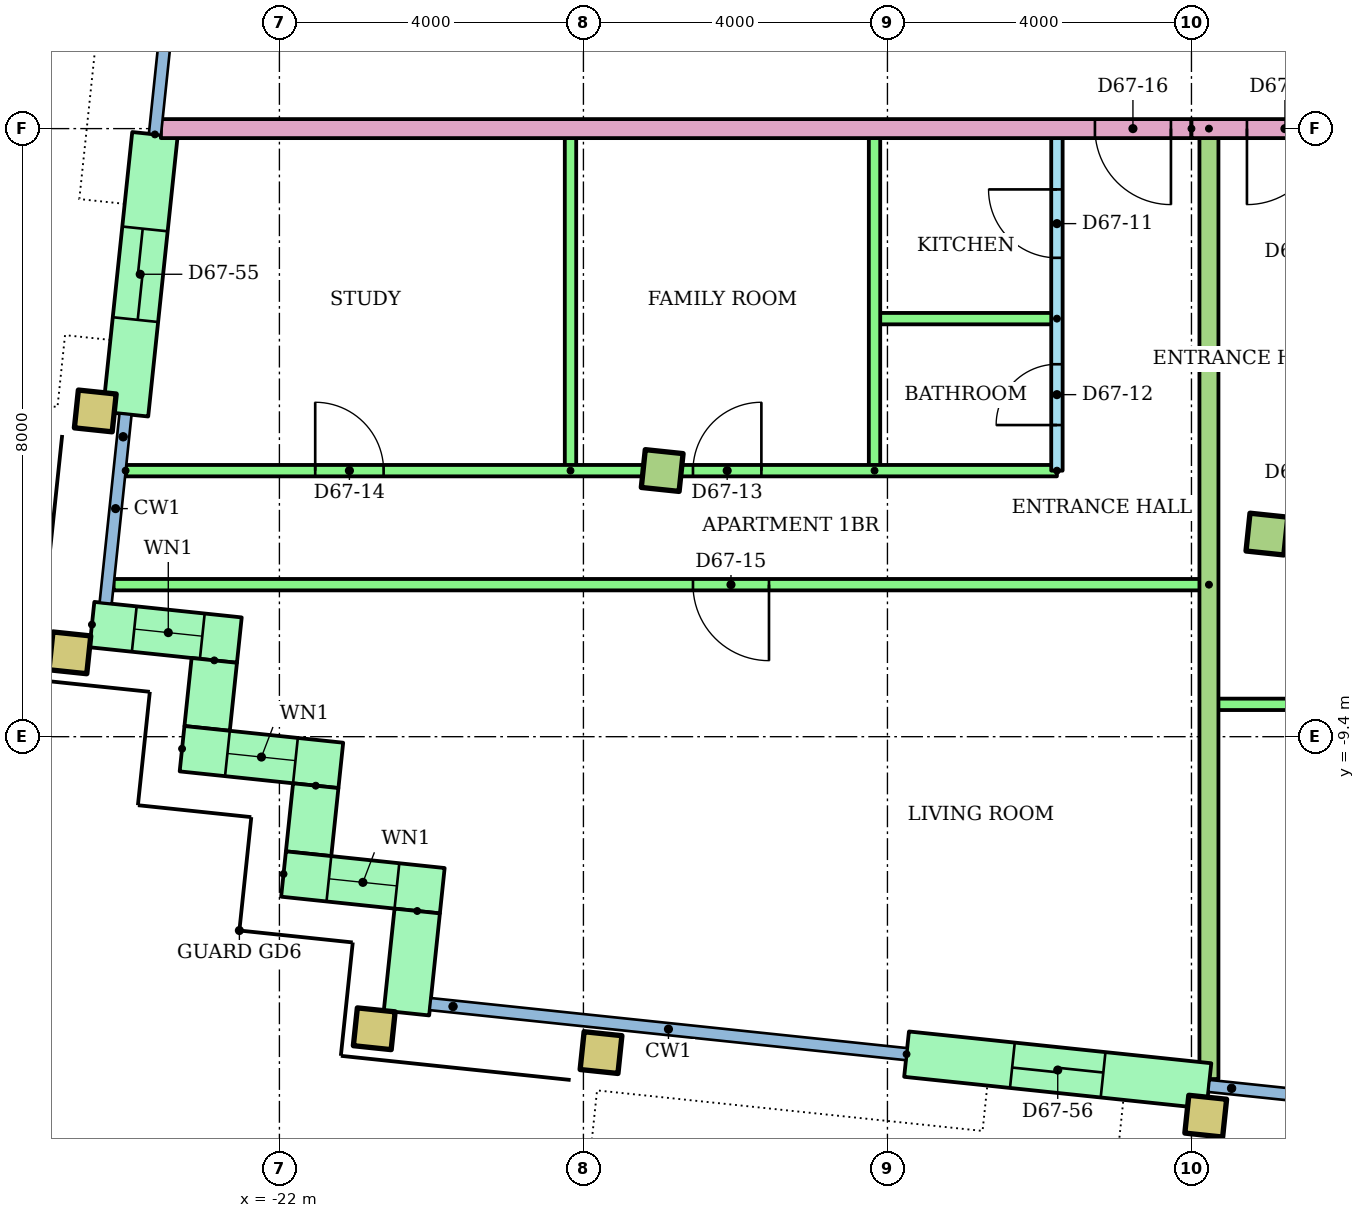
"""IFC4 building model, lengths in metres.
Left out: names, types, materials, properties, quantities, classifications, styles, units other than length and angle.
Written with IfcOpenShell. Run it as: python <this file> out.ifc"""

import sys

from ifc_helpers import new_model, si_unit, direction, frame, frame_2d, origin, origin_2d, place, context, subcontext, project, spatial, rectangle, hollow_rectangle, extrude, element, fill, save


model = new_model("IFC4")
c1 = context("Model", 3, precision=1e-05, world=origin(), true_north=direction((0.0, 1.0)))
c2 = subcontext(c1, "Body", "Model", "MODEL_VIEW")
j1 = project(units=[si_unit("LENGTHUNIT", "METRE"), si_unit("PLANEANGLEUNIT", "RADIAN")], contexts=[c1])
p1 = place(None, origin())
s1 = spatial("IfcSite", under=j1, at=p1, CompositionType="ELEMENT")
p2 = place(p1, origin())
s2 = spatial("IfcBuilding", under=s1, at=p2, CompositionType="ELEMENT")
p3 = place(p2, frame((0.0, 0.0, 259.5)))
s3 = spatial("IfcBuildingStorey", under=s2, at=p3, CompositionType="ELEMENT", Elevation=259.5)
for number, where, z_axis, x_axis in (
    (1, (-20.752, -13.243, 0.0), (0.0, 0.0, 1.0), (0.995, -0.105, 0.0)),
    (2, (-17.768, -13.556, 0.0), (0.0, 0.0, 1.0), (0.995, -0.105, 0.0)),
    (3, (-9.812, -14.392, 0.0), (0.0, 0.0, 1.0), (0.995, -0.105, 0.0)),
    (4, (-24.757, -8.297, 0.0), (0.0, 0.0, 1.0), (0.995, -0.105, 0.0)),
    (5, (-24.423, -5.115, 0.0), (0.0, 0.0, 1.0), (0.995, -0.105, 0.0)),
):
    element("IfcColumn", number, at=place(p3, frame(where, z_axis=z_axis, x_axis=x_axis)), inside=s3, PredefinedType="COLUMN", context=c2, shape_type="SweptSolid", body=[
        extrude(hollow_rectangle(XDim=0.5, YDim=0.5, WallThickness=0.025, at=origin_2d()), origin(), (0.0, 0.0, 1.0), 3.2),
    ])
for number, where, z_axis, x_axis in (
    (6, (-16.964, -5.898, 0.0), (0.0, 0.0, 1.0), (0.995, -0.105, 0.0)),
    (7, (-9.007, -6.735, 0.0), (0.0, 0.0, 1.0), (0.995, -0.105, 0.0)),
):
    element("IfcColumn", number, at=place(p3, frame(where, z_axis=z_axis, x_axis=x_axis)), inside=s3, PredefinedType="COLUMN", context=c2, shape_type="SweptSolid", body=[
        extrude(rectangle(XDim=0.5, YDim=0.5, at=origin_2d()), origin(), (0.0, 0.0, 1.0), 3.2),
    ])
p4 = place(p3, frame((-23.638, -1.476, 0.0), z_axis=(0.0, 0.0, 1.0), x_axis=(-0.104513052986, -0.994523514933, 0.0)))
e8 = element("IfcWall", 8, at=p4, inside=s3, PredefinedType="STANDARD", context=c2, shape_type="SweptSolid", body=[
    extrude(rectangle(XDim=3.7, YDim=0.6, at=frame_2d((1.85, 0.0))), origin(), (0.0, 0.0, 1.0), 2.92),
])
p5 = place(p4, frame((1.25, 0.0, 0.0)))
e9 = element("IfcOpeningElement", 9, at=p5, cuts=e8, PredefinedType="OPENING", context=c2, shape_type="SweptSolid", body=[
    extrude(rectangle(XDim=1.2, YDim=2.1, at=frame_2d((0.6, 1.05))), frame((0.0, 0.31, 0.0), z_axis=(0.0, -1.0, 0.0), x_axis=(1.0, 0.0, 0.0)), (0.0, 0.0, 1.0), 0.62),
])
p6 = place(p3, frame((-24.467, -7.925, 0.0), z_axis=(0.0, 0.0, 1.0), x_axis=(0.994521219184, -0.104534896528, 0.0)))
e10 = element("IfcWall", 10, at=p6, inside=s3, PredefinedType="STANDARD", context=c2, shape_type="SweptSolid", body=[
    extrude(rectangle(XDim=1.95, YDim=0.6, at=frame_2d((0.975, 0.0))), origin(), (0.0, 0.0, 1.0), 2.92),
])
p7 = place(p6, frame((0.56, 0.0, 0.9)))
e11 = element("IfcOpeningElement", 11, at=p7, cuts=e10, PredefinedType="OPENING", context=c2, shape_type="SweptSolid", body=[
    extrude(rectangle(XDim=0.9, YDim=1.5, at=frame_2d((0.45, 0.75))), frame((0.0, 0.31, 0.0), z_axis=(0.0, -1.0, 0.0), x_axis=(1.0, 0.0, 0.0)), (0.0, 0.0, 1.0), 0.62),
])
p8 = place(p3, frame((-22.857, -8.396, 0.0), z_axis=(0.0, 0.0, 1.0), x_axis=(-0.104444712852, -0.994530694326, 0.0)))
e12 = element("IfcWall", 12, at=p8, inside=s3, PredefinedType="STANDARD", context=c2, shape_type="SweptSolid", body=[
    extrude(rectangle(XDim=0.9, YDim=0.6, at=frame_2d((0.45, 0.0))), origin(), (0.0, 0.0, 1.0), 2.92),
])
p9 = place(p3, frame((-23.281, -9.558, 0.0), z_axis=(0.0, 0.0, 1.0), x_axis=(0.994523910136, -0.104509292252, 0.0)))
e13 = element("IfcWall", 13, at=p9, inside=s3, PredefinedType="STANDARD", context=c2, shape_type="SweptSolid", body=[
    extrude(rectangle(XDim=2.1, YDim=0.6, at=frame_2d((1.05, 0.0))), origin(), (0.0, 0.0, 1.0), 2.92),
])
p10 = place(p9, frame((0.6, 0.0, 0.9)))
e14 = element("IfcOpeningElement", 14, at=p10, cuts=e13, PredefinedType="OPENING", context=c2, shape_type="SweptSolid", body=[
    extrude(rectangle(XDim=0.9, YDim=1.5, at=frame_2d((0.45, 0.75))), frame((0.0, 0.31, 0.0), z_axis=(0.0, -1.0, 0.0), x_axis=(1.0, 0.0, 0.0)), (0.0, 0.0, 1.0), 0.62),
])
p11 = place(p3, frame((-21.522, -10.044, 0.0), z_axis=(0.0, 0.0, 1.0), x_axis=(-0.104416541099, -0.994533652495, 0.0)))
e15 = element("IfcWall", 15, at=p11, inside=s3, PredefinedType="STANDARD", context=c2, shape_type="SweptSolid", body=[
    extrude(rectangle(XDim=0.9, YDim=0.6, at=frame_2d((0.45, 0.0))), origin(), (0.0, 0.0, 1.0), 2.92),
])
p12 = place(p3, frame((-21.946, -11.207, 0.0), z_axis=(0.0, 0.0, 1.0), x_axis=(0.994511820899, -0.104624271047, 0.0)))
e16 = element("IfcWall", 16, at=p12, inside=s3, PredefinedType="STANDARD", context=c2, shape_type="SweptSolid", body=[
    extrude(rectangle(XDim=2.1, YDim=0.6, at=frame_2d((1.05, 0.0))), origin(), (0.0, 0.0, 1.0), 2.92),
])
p13 = place(p12, frame((0.6, 0.0, 0.9)))
e17 = element("IfcOpeningElement", 17, at=p13, cuts=e16, PredefinedType="OPENING", context=c2, shape_type="SweptSolid", body=[
    extrude(rectangle(XDim=0.9, YDim=1.5, at=frame_2d((0.45, 0.75))), frame((0.0, 0.31, 0.0), z_axis=(0.0, -1.0, 0.0), x_axis=(1.0, 0.0, 0.0)), (0.0, 0.0, 1.0), 0.62),
])
p14 = place(p3, frame((-20.187, -11.693, 0.0), z_axis=(0.0, 0.0, 1.0), x_axis=(-0.1043365026, -0.994542052517, 0.0)))
e18 = element("IfcWall", 18, at=p14, inside=s3, PredefinedType="STANDARD", context=c2, shape_type="SweptSolid", body=[
    extrude(rectangle(XDim=1.35, YDim=0.6, at=frame_2d((0.675, 0.0))), origin(), (0.0, 0.0, 1.0), 2.92),
])
p15 = place(p3, frame((-13.749, -13.576, 0.0), z_axis=(0.0, 0.0, 1.0), x_axis=(0.994519156568, -0.104554517933, 0.0)))
e19 = element("IfcWall", 19, at=p15, inside=s3, PredefinedType="STANDARD", context=c2, shape_type="SweptSolid", body=[
    extrude(rectangle(XDim=4.0, YDim=0.6, at=frame_2d((2.0, 0.0))), origin(), (0.0, 0.0, 1.0), 2.92),
])
p16 = place(p15, frame((1.4, 0.0, 0.0)))
e20 = element("IfcOpeningElement", 20, at=p16, cuts=e19, PredefinedType="OPENING", context=c2, shape_type="SweptSolid", body=[
    extrude(rectangle(XDim=1.2, YDim=2.1, at=frame_2d((0.6, 1.05))), frame((0.0, 0.31, 0.0), z_axis=(0.0, -1.0, 0.0), x_axis=(1.0, 0.0, 0.0)), (0.0, 0.0, 1.0), 0.62),
])
p17 = place(p3, frame((-11.77, -5.9, 0.0), z_axis=(0.0, 0.0, 1.0), x_axis=(0.0, 1.0, 0.0)))
e21 = element("IfcWall", 21, at=p17, inside=s3, PredefinedType="PARTITIONING", context=c2, shape_type="SweptSolid", body=[
    extrude(rectangle(XDim=4.5, YDim=0.15, at=frame_2d((2.25, 0.0))), origin(), (0.0, 0.0, 1.0), 2.4),
])
p18 = place(p17, frame((2.8, 0.0, 0.0)))
e22 = element("IfcOpeningElement", 22, at=p18, cuts=e21, PredefinedType="OPENING", context=c2, shape_type="SweptSolid", body=[
    extrude(rectangle(XDim=0.9, YDim=2.1, at=frame_2d((0.45, 1.05))), frame((0.0, 0.085, 0.0), z_axis=(0.0, -1.0, 0.0), x_axis=(1.0, 0.0, 0.0)), (0.0, 0.0, 1.0), 0.17),
])
p19 = place(p17, frame((0.6, 0.0, 0.0)))
e23 = element("IfcOpeningElement", 23, at=p19, cuts=e21, PredefinedType="OPENING", context=c2, shape_type="SweptSolid", body=[
    extrude(rectangle(XDim=0.8, YDim=2.1, at=frame_2d((0.4, 1.05))), frame((0.0, 0.085, 0.0), z_axis=(0.0, -1.0, 0.0), x_axis=(1.0, 0.0, 0.0)), (0.0, 0.0, 1.0), 0.17),
])
p20 = place(p3, frame((-11.77, -3.9, 0.0), z_axis=(0.0, 0.0, 1.0), x_axis=(-1.0, 0.0, 0.0)))
e24 = element("IfcWall", 24, at=p20, inside=s3, PredefinedType="PARTITIONING", context=c2, shape_type="SweptSolid", body=[
    extrude(rectangle(XDim=2.4, YDim=0.15, at=frame_2d((1.2, 0.0))), origin(), (0.0, 0.0, 1.0), 2.4),
])
for number, where, z_axis, x_axis in (
    (25, (-14.17, -5.9, 0.0), (0.0, 0.0, 1.0), (0.0, 1.0, 0.0)),
    (26, (-18.17, -5.9, 0.0), (0.0, 0.0, 1.0), (0.0, 1.0, 0.0)),
):
    element("IfcWall", number, at=place(p3, frame(where, z_axis=z_axis, x_axis=x_axis)), inside=s3, PredefinedType="PARTITIONING", context=c2, shape_type="SweptSolid", body=[
        extrude(rectangle(XDim=4.5, YDim=0.15, at=frame_2d((2.25, 0.0))), origin(), (0.0, 0.0, 1.0), 2.4),
    ])
p21 = place(p3, frame((-24.023, -5.9, 0.0)))
e27 = element("IfcWall", 27, at=p21, inside=s3, PredefinedType="PARTITIONING", context=c2, shape_type="SweptSolid", body=[
    extrude(rectangle(XDim=12.253, YDim=0.15, at=frame_2d((6.127, 0.0))), origin(), (0.0, 0.0, 1.0), 2.4),
])
p22 = place(p21, frame((7.465, 0.0, 0.0)))
e28 = element("IfcOpeningElement", 28, at=p22, cuts=e27, PredefinedType="OPENING", context=c2, shape_type="SweptSolid", body=[
    extrude(rectangle(XDim=0.9, YDim=2.1, at=frame_2d((0.45, 1.05))), frame((0.0, 0.085, 0.0), z_axis=(0.0, -1.0, 0.0), x_axis=(1.0, 0.0, 0.0)), (0.0, 0.0, 1.0), 0.17),
])
p23 = place(p21, frame((2.494, 0.0, 0.0)))
e29 = element("IfcOpeningElement", 29, at=p23, cuts=e27, PredefinedType="OPENING", context=c2, shape_type="SweptSolid", body=[
    extrude(rectangle(XDim=0.9, YDim=2.1, at=frame_2d((0.45, 1.05))), frame((0.0, 0.085, 0.0), z_axis=(0.0, -1.0, 0.0), x_axis=(1.0, 0.0, 0.0)), (0.0, 0.0, 1.0), 0.17),
])
p24 = place(p3, frame((-9.77, -7.4, 0.0), z_axis=(0.0, 0.0, 1.0), x_axis=(-1.0, 0.0, 0.0)))
e30 = element("IfcWall", 30, at=p24, inside=s3, PredefinedType="PARTITIONING", context=c2, shape_type="SweptSolid", body=[
    extrude(rectangle(XDim=14.411, YDim=0.15, at=frame_2d((7.206, 0.0))), origin(), (0.0, 0.0, 1.0), 2.4),
])
p25 = place(p24, frame((5.789, 0.0, 0.0)))
e31 = element("IfcOpeningElement", 31, at=p25, cuts=e30, PredefinedType="OPENING", context=c2, shape_type="SweptSolid", body=[
    extrude(rectangle(XDim=1.0, YDim=2.1, at=frame_2d((0.5, 1.05))), frame((0.0, 0.085, 0.0), z_axis=(0.0, -1.0, 0.0), x_axis=(1.0, 0.0, 0.0)), (0.0, 0.0, 1.0), 0.17),
])
p26 = place(p3, frame((14.098, -8.975, 0.0), z_axis=(0.0, 0.0, 1.0), x_axis=(-1.0, 0.0, 0.0)))
e32 = element("IfcWall", 32, at=p26, inside=s3, PredefinedType="PARTITIONING", context=c2, shape_type="SweptSolid", body=[
    extrude(rectangle(XDim=23.868, YDim=0.15, at=frame_2d((11.934, 0.0))), origin(), (0.0, 0.0, 1.0), 2.4),
])
p27 = place(p26, frame((21.429, 0.0, 0.0)))
e33 = element("IfcOpeningElement", 33, at=p27, cuts=e32, PredefinedType="OPENING", context=c2, shape_type="SweptSolid", body=[
    extrude(rectangle(XDim=0.9, YDim=2.1, at=frame_2d((0.45, 1.05))), frame((0.0, 0.085, 0.0), z_axis=(0.0, -1.0, 0.0), x_axis=(1.0, 0.0, 0.0)), (0.0, 0.0, 1.0), 0.17),
])
p28 = place(p26, frame((17.451, 0.0, 0.0)))
e34 = element("IfcOpeningElement", 34, at=p28, cuts=e32, PredefinedType="OPENING", context=c2, shape_type="SweptSolid", body=[
    extrude(rectangle(XDim=0.9, YDim=2.1, at=frame_2d((0.45, 1.05))), frame((0.0, 0.085, 0.0), z_axis=(0.0, -1.0, 0.0), x_axis=(1.0, 0.0, 0.0)), (0.0, 0.0, 1.0), 0.17),
])
p29 = place(p26, frame((12.252, 0.0, 0.0)))
e35 = element("IfcOpeningElement", 35, at=p29, cuts=e32, PredefinedType="OPENING", context=c2, shape_type="SweptSolid", body=[
    extrude(rectangle(XDim=0.9, YDim=2.1, at=frame_2d((0.45, 1.05))), frame((0.0, 0.085, 0.0), z_axis=(0.0, -1.0, 0.0), x_axis=(1.0, 0.0, 0.0)), (0.0, 0.0, 1.0), 0.17),
])
p30 = place(p26, frame((9.495, 0.0, 0.0)))
e36 = element("IfcOpeningElement", 36, at=p30, cuts=e32, PredefinedType="OPENING", context=c2, shape_type="SweptSolid", body=[
    extrude(rectangle(XDim=0.9, YDim=2.1, at=frame_2d((0.45, 1.05))), frame((0.0, 0.085, 0.0), z_axis=(0.0, -1.0, 0.0), x_axis=(1.0, 0.0, 0.0)), (0.0, 0.0, 1.0), 0.17),
])
p31 = place(p26, frame((3.478, 0.0, 0.0)))
e37 = element("IfcOpeningElement", 37, at=p31, cuts=e32, PredefinedType="OPENING", context=c2, shape_type="SweptSolid", body=[
    extrude(rectangle(XDim=1.0, YDim=2.1, at=frame_2d((0.5, 1.05))), frame((0.0, 0.085, 0.0), z_axis=(0.0, -1.0, 0.0), x_axis=(1.0, 0.0, 0.0)), (0.0, 0.0, 1.0), 0.17),
])
p32 = place(p3, frame((-9.77, -1.4, 0.0), z_axis=(0.0, 0.0, 1.0), x_axis=(0.0, -1.0, 0.0)))
e38 = element("IfcWall", 38, at=p32, inside=s3, PredefinedType="PARTITIONING", context=c2, shape_type="SweptSolid", body=[
    extrude(rectangle(XDim=12.504, YDim=0.25, at=frame_2d((6.252, 0.0))), origin(), (0.0, 0.0, 1.0), 2.4),
])
p33 = place(p3, frame((-10.0, -1.4, 0.0), z_axis=(0.0, 0.0, 1.0), x_axis=(-1.0, 0.0, 0.0)))
e39 = element("IfcWall", 39, at=p33, inside=s3, PredefinedType="PARTITIONING", context=c2, shape_type="SweptSolid", body=[
    extrude(rectangle(XDim=13.56, YDim=0.25, at=frame_2d((6.78, 0.0))), origin(), (0.0, 0.0, 1.0), 2.4),
])
p34 = place(p33, frame((0.27, 0.0, 0.0)))
e40 = element("IfcOpeningElement", 40, at=p34, cuts=e39, PredefinedType="OPENING", context=c2, shape_type="SweptSolid", body=[
    extrude(rectangle(XDim=1.0, YDim=2.1, at=frame_2d((0.5, 1.05))), frame((0.0, 0.135, 0.0), z_axis=(0.0, -1.0, 0.0), x_axis=(1.0, 0.0, 0.0)), (0.0, 0.0, 1.0), 0.27),
])
p35 = place(p3, frame((10.0, -1.4, 0.0), z_axis=(0.0, 0.0, 1.0), x_axis=(-1.0, 0.0, 0.0)))
e41 = element("IfcWall", 41, at=p35, inside=s3, PredefinedType="PARTITIONING", context=c2, shape_type="SweptSolid", body=[
    extrude(rectangle(XDim=20.0, YDim=0.25, at=frame_2d((10.0, 0.0))), origin(), (0.0, 0.0, 1.0), 2.4),
])
p36 = place(p35, frame((18.27, 0.0, 0.0)))
e42 = element("IfcOpeningElement", 42, at=p36, cuts=e41, PredefinedType="OPENING", context=c2, shape_type="SweptSolid", body=[
    extrude(rectangle(XDim=1.0, YDim=2.1, at=frame_2d((0.5, 1.05))), frame((0.0, 0.135, 0.0), z_axis=(0.0, -1.0, 0.0), x_axis=(1.0, 0.0, 0.0)), (0.0, 0.0, 1.0), 0.27),
])
p37 = place(p7, origin())
e43 = element("IfcWindow", 43, at=p37, inside=s3, PartitioningType="SINGLE_PANEL", PredefinedType="WINDOW", context=c2, shape_type="SweptSolid", body=[
    extrude(rectangle(XDim=0.9, YDim=1.5, at=frame_2d((0.45, 0.75))), frame((0.0, 0.03, 0.0), z_axis=(0.0, -1.0, 0.0), x_axis=(1.0, 0.0, 0.0)), (0.0, 0.0, 1.0), 0.06),
])
fill(e11, e43)
p38 = place(p10, origin())
e44 = element("IfcWindow", 44, at=p38, inside=s3, PartitioningType="SINGLE_PANEL", PredefinedType="WINDOW", context=c2, shape_type="SweptSolid", body=[
    extrude(rectangle(XDim=0.9, YDim=1.5, at=frame_2d((0.45, 0.75))), frame((0.0, 0.03, 0.0), z_axis=(0.0, -1.0, 0.0), x_axis=(1.0, 0.0, 0.0)), (0.0, 0.0, 1.0), 0.06),
])
fill(e14, e44)
p39 = place(p13, origin())
e45 = element("IfcWindow", 45, at=p39, inside=s3, PartitioningType="SINGLE_PANEL", PredefinedType="WINDOW", context=c2, shape_type="SweptSolid", body=[
    extrude(rectangle(XDim=0.9, YDim=1.5, at=frame_2d((0.45, 0.75))), frame((0.0, 0.03, 0.0), z_axis=(0.0, -1.0, 0.0), x_axis=(1.0, 0.0, 0.0)), (0.0, 0.0, 1.0), 0.06),
])
fill(e17, e45)
p40 = place(p18, origin())
e46 = element("IfcDoor", 46, at=p40, inside=s3, OperationType="SINGLE_SWING_RIGHT", PredefinedType="DOOR", context=c2, shape_type="SweptSolid", body=[
    extrude(rectangle(XDim=0.9, YDim=2.1, at=frame_2d((0.45, 1.05))), frame((0.0, 0.025, 0.0), z_axis=(0.0, -1.0, 0.0), x_axis=(1.0, 0.0, 0.0)), (0.0, 0.0, 1.0), 0.05),
])
fill(e22, e46)
p41 = place(p19, origin())
e47 = element("IfcDoor", 47, at=p41, inside=s3, OperationType="SINGLE_SWING_LEFT", PredefinedType="DOOR", context=c2, shape_type="SweptSolid", body=[
    extrude(rectangle(XDim=0.8, YDim=2.1, at=frame_2d((0.4, 1.05))), frame((0.0, 0.025, 0.0), z_axis=(0.0, -1.0, 0.0), x_axis=(1.0, 0.0, 0.0)), (0.0, 0.0, 1.0), 0.05),
])
fill(e23, e47)
p42 = place(p22, origin())
e48 = element("IfcDoor", 48, at=p42, inside=s3, OperationType="SINGLE_SWING_RIGHT", PredefinedType="DOOR", context=c2, shape_type="SweptSolid", body=[
    extrude(rectangle(XDim=0.9, YDim=2.1, at=frame_2d((0.45, 1.05))), frame((0.0, 0.025, 0.0), z_axis=(0.0, -1.0, 0.0), x_axis=(1.0, 0.0, 0.0)), (0.0, 0.0, 1.0), 0.05),
])
fill(e28, e48)
p43 = place(p23, origin())
e49 = element("IfcDoor", 49, at=p43, inside=s3, OperationType="SINGLE_SWING_LEFT", PredefinedType="DOOR", context=c2, shape_type="SweptSolid", body=[
    extrude(rectangle(XDim=0.9, YDim=2.1, at=frame_2d((0.45, 1.05))), frame((0.0, 0.025, 0.0), z_axis=(0.0, -1.0, 0.0), x_axis=(1.0, 0.0, 0.0)), (0.0, 0.0, 1.0), 0.05),
])
fill(e29, e49)
p44 = place(p25, origin())
e50 = element("IfcDoor", 50, at=p44, inside=s3, OperationType="SINGLE_SWING_LEFT", PredefinedType="DOOR", context=c2, shape_type="SweptSolid", body=[
    extrude(rectangle(XDim=1.0, YDim=2.1, at=frame_2d((0.5, 1.05))), frame((0.0, 0.025, 0.0), z_axis=(0.0, -1.0, 0.0), x_axis=(1.0, 0.0, 0.0)), (0.0, 0.0, 1.0), 0.05),
])
fill(e31, e50)
p45 = place(p34, origin())
e51 = element("IfcDoor", 51, at=p45, inside=s3, OperationType="SINGLE_SWING_LEFT", PredefinedType="DOOR", context=c2, shape_type="SweptSolid", body=[
    extrude(rectangle(XDim=1.0, YDim=2.1, at=frame_2d((0.5, 1.05))), frame((0.0, 0.025, 0.0), z_axis=(0.0, -1.0, 0.0), x_axis=(1.0, 0.0, 0.0)), (0.0, 0.0, 1.0), 0.05),
])
fill(e40, e51)
p46 = place(p36, origin())
e52 = element("IfcDoor", 52, at=p46, inside=s3, OperationType="SINGLE_SWING_RIGHT", PredefinedType="DOOR", context=c2, shape_type="SweptSolid", body=[
    extrude(rectangle(XDim=1.0, YDim=2.1, at=frame_2d((0.5, 1.05))), frame((0.0, 0.025, 0.0), z_axis=(0.0, -1.0, 0.0), x_axis=(1.0, 0.0, 0.0)), (0.0, 0.0, 1.0), 0.05),
])
fill(e42, e52)
p47 = place(p5, origin())
e53 = element("IfcDoor", 53, at=p47, inside=s3, OperationType="SLIDING_TO_LEFT", PredefinedType="DOOR", context=c2, shape_type="SweptSolid", body=[
    extrude(rectangle(XDim=1.2, YDim=2.1, at=frame_2d((0.6, 1.05))), frame((0.0, 0.025, 0.0), z_axis=(0.0, -1.0, 0.0), x_axis=(1.0, 0.0, 0.0)), (0.0, 0.0, 1.0), 0.05),
])
fill(e9, e53)
p48 = place(p16, origin())
e54 = element("IfcDoor", 54, at=p48, inside=s3, OperationType="SLIDING_TO_LEFT", PredefinedType="DOOR", context=c2, shape_type="SweptSolid", body=[
    extrude(rectangle(XDim=1.2, YDim=2.1, at=frame_2d((0.6, 1.05))), frame((0.0, 0.025, 0.0), z_axis=(0.0, -1.0, 0.0), x_axis=(1.0, 0.0, 0.0)), (0.0, 0.0, 1.0), 0.05),
])
fill(e20, e54)
save(model, sys.argv[1])
